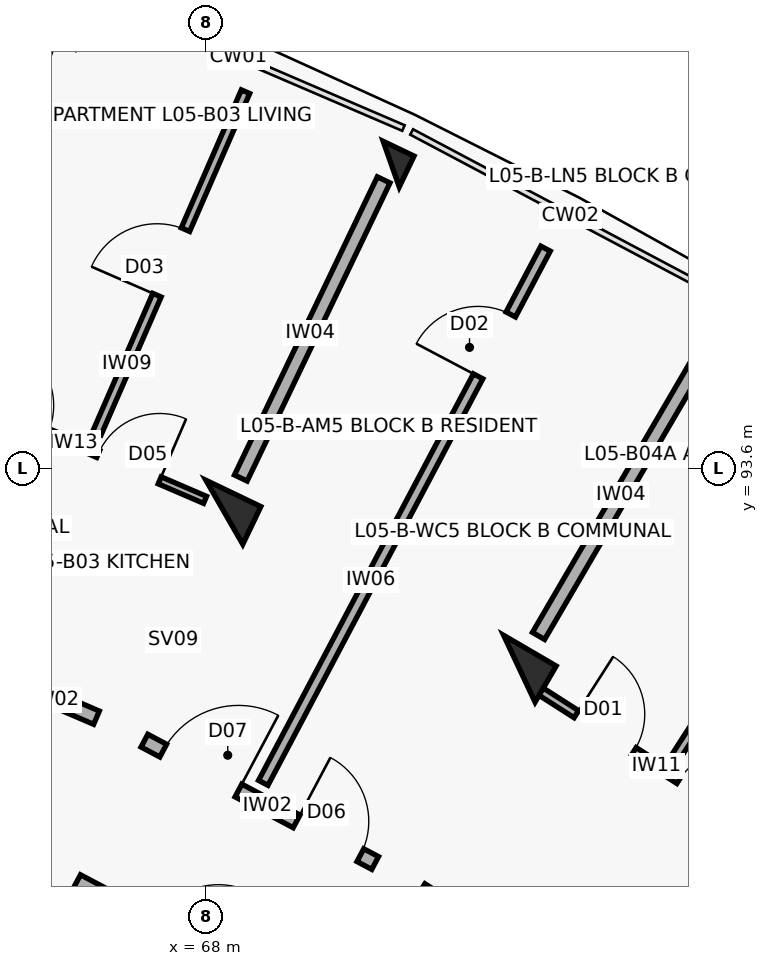
"""IFC4 building model, lengths in metres.
Left out: names, types, materials, properties, quantities, classifications, styles, units other than length and angle.
Written with IfcOpenShell. Run it as: python <this file> out.ifc"""

import sys

from ifc_helpers import new_model, si_unit, direction, frame, frame_2d, origin, origin_2d, place, context, subcontext, project, spatial, rectangle, extrude, element, fill, save


model = new_model("IFC4")
c1 = context("Model", 3, precision=1e-05, world=origin(), true_north=direction((0.0, 1.0)))
c2 = subcontext(c1, "Body", "Model", "MODEL_VIEW")
j1 = project(units=[si_unit("LENGTHUNIT", "METRE"), si_unit("PLANEANGLEUNIT", "RADIAN")], contexts=[c1])
p1 = place(None, origin())
s1 = spatial("IfcSite", under=j1, at=p1, CompositionType="ELEMENT")
p2 = place(p1, origin())
s2 = spatial("IfcBuilding", under=s1, at=p2, CompositionType="ELEMENT")
p3 = place(p2, frame((0.0, 0.0, 17.4)))
s3 = spatial("IfcBuildingStorey", under=s2, at=p3, CompositionType="ELEMENT", Elevation=17.4)
for number, where, z_axis, x_axis in (
    (1, (65.706, 87.716, 0.0), (0.0, 0.0, 1.0), (0.432, 0.902, 0.0)),
    (2, (68.246, 93.019, 0.0), (0.0, 0.0, 1.0), (0.432, 0.902, 0.0)),
):
    element("IfcColumn", number, at=place(p3, frame(where, z_axis=z_axis, x_axis=x_axis)), inside=s3, PredefinedType="COLUMN", context=c2, shape_type="SweptSolid", body=[
        extrude(rectangle(XDim=0.55, YDim=0.8, at=origin_2d()), origin(), (0.0, 0.0, 1.0), 3.1),
    ])
p4 = place(p3, frame((70.441, 97.6, 0.0), z_axis=(0.0, 0.0, 1.0), x_axis=(0.432085748802, 0.901832526405, 0.0)))
e3 = element("IfcColumn", 3, at=p4, inside=s3, PredefinedType="COLUMN", context=c2, shape_type="SweptSolid", body=[
    extrude(rectangle(XDim=0.45, YDim=0.45, at=origin_2d()), origin(), (0.0, 0.0, 1.0), 3.1),
])
p5 = place(p3, frame((72.127, 90.96, 0.0), z_axis=(0.0, 0.0, 1.0), x_axis=(0.504226211181, 0.863571611366, 0.0)))
e4 = element("IfcColumn", 4, at=p5, inside=s3, PredefinedType="COLUMN", context=c2, shape_type="SweptSolid", body=[
    extrude(rectangle(XDim=0.55, YDim=0.8, at=origin_2d()), origin(), (0.0, 0.0, 1.0), 3.1),
])
p6 = place(p3, frame((74.689, 95.347, 0.0), z_axis=(0.0, 0.0, 1.0), x_axis=(0.504226211181, 0.863571611366, 0.0)))
e5 = element("IfcColumn", 5, at=p6, inside=s3, PredefinedType="COLUMN", context=c2, shape_type="SweptSolid", body=[
    extrude(rectangle(XDim=0.5, YDim=0.75, at=origin_2d()), origin(), (0.0, 0.0, 1.0), 3.1),
])
p7 = place(p3, frame((63.407, 91.673, 0.0), z_axis=(0.0, 0.0, 1.0), x_axis=(0.918718172399, -0.394913813008, 0.0)))
e6 = element("IfcWall", 6, at=p7, inside=s3, PredefinedType="SOLIDWALL", context=c2, shape_type="SweptSolid", body=[
    extrude(rectangle(XDim=3.436, YDim=0.19, at=frame_2d((1.718, 0.0))), origin(), (0.0, 0.0, 1.0), 2.08),
])
p8 = place(p7, frame((1.208, 0.0, 0.0)))
e7 = element("IfcOpeningElement", 7, at=p8, cuts=e6, PredefinedType="OPENING", context=c2, shape_type="SweptSolid", body=[
    extrude(rectangle(XDim=1.02, YDim=2.15, at=frame_2d((0.51, 1.075))), frame((0.0, 0.105, 0.0), z_axis=(0.0, -1.0, 0.0), x_axis=(1.0, 0.0, 0.0)), (0.0, 0.0, 1.0), 0.21),
])
p9 = place(p3, frame((64.503, 94.682, 0.0), z_axis=(0.0, 0.0, 1.0), x_axis=(0.918732171064, -0.394881245253, 0.0)))
e8 = element("IfcWall", 8, at=p9, inside=s3, PredefinedType="PARTITIONING", context=c2, shape_type="SweptSolid", body=[
    extrude(rectangle(XDim=3.797, YDim=0.1, at=frame_2d((1.899, 0.0))), origin(), (0.0, 0.0, 1.0), 2.08),
])
p10 = place(p9, frame((0.65, 0.0, 0.0)))
e9 = element("IfcOpeningElement", 9, at=p10, cuts=e8, PredefinedType="OPENING", context=c2, shape_type="SweptSolid", body=[
    extrude(rectangle(XDim=0.9, YDim=2.1, at=frame_2d((0.45, 1.05))), frame((0.0, 0.06, 0.0), z_axis=(0.0, -1.0, 0.0), x_axis=(1.0, 0.0, 0.0)), (0.0, 0.0, 1.0), 0.12),
])
p11 = place(p9, frame((2.267, 0.0, 0.0)))
e10 = element("IfcOpeningElement", 10, at=p11, cuts=e8, PredefinedType="OPENING", context=c2, shape_type="SweptSolid", body=[
    extrude(rectangle(XDim=0.88, YDim=2.1, at=frame_2d((0.44, 1.05))), frame((0.0, 0.06, 0.0), z_axis=(0.0, -1.0, 0.0), x_axis=(1.0, 0.0, 0.0)), (0.0, 0.0, 1.0), 0.12),
])
p12 = place(p3, frame((66.569, 94.06, 0.0), z_axis=(0.0, 0.0, 1.0), x_axis=(0.399048563147, 0.916929792433, 0.0)))
e11 = element("IfcWall", 11, at=p12, inside=s3, PredefinedType="PARTITIONING", context=c2, shape_type="SweptSolid", body=[
    extrude(rectangle(XDim=4.9, YDim=0.12, at=frame_2d((2.45, 0.0))), origin(), (0.0, 0.0, 1.0), 2.08),
])
p13 = place(p12, frame((1.98, 0.0, 0.0)))
e12 = element("IfcOpeningElement", 12, at=p13, cuts=e11, PredefinedType="OPENING", context=c2, shape_type="SweptSolid", body=[
    extrude(rectangle(XDim=0.94, YDim=2.1, at=frame_2d((0.47, 1.05))), frame((0.0, 0.07, 0.0), z_axis=(0.0, -1.0, 0.0), x_axis=(1.0, 0.0, 0.0)), (0.0, 0.0, 1.0), 0.14),
])
p14 = place(p3, frame((64.389, 95.22, 0.0), z_axis=(0.0, 0.0, 1.0), x_axis=(0.357064016205, 0.934079915388, 0.0)))
e13 = element("IfcWall", 13, at=p14, inside=s3, PredefinedType="SOLIDWALL", context=c2, shape_type="SweptSolid", body=[
    extrude(rectangle(XDim=4.35, YDim=0.185, at=frame_2d((2.175, 0.0))), origin(), (0.0, 0.0, 1.0), 2.08),
])
p15 = place(p3, frame((67.194, 90.014, 0.0), z_axis=(0.0, 0.0, 1.0), x_axis=(0.883410853063, -0.468599258099, 0.0)))
e14 = element("IfcWall", 14, at=p15, inside=s3, PredefinedType="SOLIDWALL", context=c2, shape_type="SweptSolid", body=[
    extrude(rectangle(XDim=3.436, YDim=0.19, at=frame_2d((1.718, 0.0))), origin(), (0.0, 0.0, 1.0), 2.08),
])
p16 = place(p15, frame((0.28, 0.0, 0.0)))
e15 = element("IfcOpeningElement", 15, at=p16, cuts=e14, PredefinedType="OPENING", context=c2, shape_type="SweptSolid", body=[
    extrude(rectangle(XDim=1.12, YDim=2.15, at=frame_2d((0.56, 1.075))), frame((0.0, 0.105, 0.0), z_axis=(0.0, -1.0, 0.0), x_axis=(1.0, 0.0, 0.0)), (0.0, 0.0, 1.0), 0.21),
])
p17 = place(p15, frame((2.266, 0.0, 0.0)))
e16 = element("IfcOpeningElement", 16, at=p17, cuts=e14, PredefinedType="OPENING", context=c2, shape_type="SweptSolid", body=[
    extrude(rectangle(XDim=0.95, YDim=2.1, at=frame_2d((0.475, 1.05))), frame((0.0, 0.105, 0.0), z_axis=(0.0, -1.0, 0.0), x_axis=(1.0, 0.0, 0.0)), (0.0, 0.0, 1.0), 0.21),
])
p18 = place(p3, frame((66.309, 88.165, 0.0), z_axis=(0.0, 0.0, 1.0), x_axis=(0.883444301944, -0.468536194293, 0.0)))
e17 = element("IfcWall", 17, at=p18, inside=s3, PredefinedType="SOLIDWALL", context=c2, shape_type="SweptSolid", body=[
    extrude(rectangle(XDim=3.269, YDim=0.19, at=frame_2d((1.634, 0.0))), origin(), (0.0, 0.0, 1.0), 2.08),
])
p19 = place(p18, frame((1.164, 0.0, 0.0)))
e18 = element("IfcOpeningElement", 18, at=p19, cuts=e17, PredefinedType="OPENING", context=c2, shape_type="SweptSolid", body=[
    extrude(rectangle(XDim=0.94, YDim=2.1, at=frame_2d((0.47, 1.05))), frame((0.0, 0.105, 0.0), z_axis=(0.0, -1.0, 0.0), x_axis=(1.0, 0.0, 0.0)), (0.0, 0.0, 1.0), 0.21),
])
p20 = place(p3, frame((68.758, 89.459, 0.0), z_axis=(0.0, 0.0, 1.0), x_axis=(0.467208910392, 0.884146952746, 0.0)))
e19 = element("IfcWall", 19, at=p20, inside=s3, PredefinedType="PARTITIONING", context=c2, shape_type="SweptSolid", body=[
    extrude(rectangle(XDim=7.95, YDim=0.14, at=frame_2d((3.975, 0.0))), origin(), (0.0, 0.0, 1.0), 2.08),
])
p21 = place(p20, frame((6.05, 0.0, 0.0)))
e20 = element("IfcOpeningElement", 20, at=p21, cuts=e19, PredefinedType="OPENING", context=c2, shape_type="SweptSolid", body=[
    extrude(rectangle(XDim=0.92, YDim=2.1, at=frame_2d((0.46, 1.05))), frame((0.0, 0.08, 0.0), z_axis=(0.0, -1.0, 0.0), x_axis=(1.0, 0.0, 0.0)), (0.0, 0.0, 1.0), 0.16),
])
p22 = place(p3, frame((68.462, 93.469, 0.0), z_axis=(0.0, 0.0, 1.0), x_axis=(0.432086898897, 0.901831975371, 0.0)))
e21 = element("IfcWall", 21, at=p22, inside=s3, PredefinedType="SOLIDWALL", context=c2, shape_type="SweptSolid", body=[
    extrude(rectangle(XDim=4.35, YDim=0.185, at=frame_2d((2.175, 0.0))), origin(), (0.0, 0.0, 1.0), 2.08),
])
p23 = place(p3, frame((70.834, 88.051, 0.0), z_axis=(0.0, 0.0, 1.0), x_axis=(0.842257205985, -0.539075874963, 0.0)))
e22 = element("IfcWall", 22, at=p23, inside=s3, PredefinedType="SOLIDWALL", context=c2, shape_type="SweptSolid", body=[
    extrude(rectangle(XDim=3.436, YDim=0.19, at=frame_2d((1.718, 0.0))), origin(), (0.0, 0.0, 1.0), 2.08),
])
p24 = place(p23, frame((1.208, 0.0, 0.0)))
e23 = element("IfcOpeningElement", 23, at=p24, cuts=e22, PredefinedType="OPENING", context=c2, shape_type="SweptSolid", body=[
    extrude(rectangle(XDim=1.02, YDim=2.15, at=frame_2d((0.51, 1.075))), frame((0.0, 0.105, 0.0), z_axis=(0.0, -1.0, 0.0), x_axis=(1.0, 0.0, 0.0)), (0.0, 0.0, 1.0), 0.21),
])
p25 = place(p3, frame((72.33, 90.712, 0.0), z_axis=(0.0, 0.0, 1.0), x_axis=(0.842245628842, -0.539093962771, 0.0)))
e24 = element("IfcWall", 24, at=p25, inside=s3, PredefinedType="PARTITIONING", context=c2, shape_type="SweptSolid", body=[
    extrude(rectangle(XDim=3.785, YDim=0.11, at=frame_2d((1.893, 0.0))), origin(), (0.0, 0.0, 1.0), 2.08),
])
p26 = place(p25, frame((0.65, 0.0, 0.0)))
e25 = element("IfcOpeningElement", 25, at=p26, cuts=e24, PredefinedType="OPENING", context=c2, shape_type="SweptSolid", body=[
    extrude(rectangle(XDim=0.9, YDim=2.1, at=frame_2d((0.45, 1.05))), frame((0.0, 0.065, 0.0), z_axis=(0.0, -1.0, 0.0), x_axis=(1.0, 0.0, 0.0)), (0.0, 0.0, 1.0), 0.13),
])
p27 = place(p25, frame((2.255, 0.0, 0.0)))
e26 = element("IfcOpeningElement", 26, at=p27, cuts=e24, PredefinedType="OPENING", context=c2, shape_type="SweptSolid", body=[
    extrude(rectangle(XDim=0.88, YDim=2.1, at=frame_2d((0.44, 1.05))), frame((0.0, 0.065, 0.0), z_axis=(0.0, -1.0, 0.0), x_axis=(1.0, 0.0, 0.0)), (0.0, 0.0, 1.0), 0.13),
])
p28 = place(p3, frame((74.192, 89.81, 0.0), z_axis=(0.0, 0.0, 1.0), x_axis=(0.541612517702, 0.840628265447, 0.0)))
e27 = element("IfcWall", 27, at=p28, inside=s3, PredefinedType="PARTITIONING", context=c2, shape_type="SweptSolid", body=[
    extrude(rectangle(XDim=5.05, YDim=0.12, at=frame_2d((2.525, 0.0))), origin(), (0.0, 0.0, 1.0), 2.08),
])
p29 = place(p28, frame((2.1, 0.0, 0.0)))
e28 = element("IfcOpeningElement", 28, at=p29, cuts=e27, PredefinedType="OPENING", context=c2, shape_type="SweptSolid", body=[
    extrude(rectangle(XDim=0.85, YDim=2.1, at=frame_2d((0.425, 1.05))), frame((0.0, 0.07, 0.0), z_axis=(0.0, -1.0, 0.0), x_axis=(1.0, 0.0, 0.0)), (0.0, 0.0, 1.0), 0.14),
])
p30 = place(p3, frame((72.379, 91.392, 0.0), z_axis=(0.0, 0.0, 1.0), x_axis=(0.504216452091, 0.863577309475, 0.0)))
e29 = element("IfcWall", 29, at=p30, inside=s3, PredefinedType="SOLIDWALL", context=c2, shape_type="SweptSolid", body=[
    extrude(rectangle(XDim=4.35, YDim=0.185, at=frame_2d((2.175, 0.0))), origin(), (0.0, 0.0, 1.0), 2.08),
])
p31 = place(p11, origin())
e30 = element("IfcDoor", 30, at=p31, inside=s3, OperationType="SINGLE_SWING_RIGHT", PredefinedType="DOOR", context=c2, shape_type="SweptSolid", body=[
    extrude(rectangle(XDim=0.88, YDim=2.1, at=frame_2d((0.44, 1.05))), frame((0.0, 0.025, 0.0), z_axis=(0.0, -1.0, 0.0), x_axis=(1.0, 0.0, 0.0)), (0.0, 0.0, 1.0), 0.05),
])
fill(e10, e30)
p32 = place(p13, origin())
e31 = element("IfcDoor", 31, at=p32, inside=s3, OperationType="SINGLE_SWING_LEFT", PredefinedType="DOOR", context=c2, shape_type="SweptSolid", body=[
    extrude(rectangle(XDim=0.94, YDim=2.1, at=frame_2d((0.47, 1.05))), frame((0.0, 0.025, 0.0), z_axis=(0.0, -1.0, 0.0), x_axis=(1.0, 0.0, 0.0)), (0.0, 0.0, 1.0), 0.05),
])
fill(e12, e31)
p33 = place(p16, origin())
e32 = element("IfcDoor", 32, at=p33, inside=s3, OperationType="SINGLE_SWING_RIGHT", PredefinedType="DOOR", context=c2, shape_type="SweptSolid", body=[
    extrude(rectangle(XDim=1.12, YDim=2.15, at=frame_2d((0.56, 1.075))), frame((0.0, 0.025, 0.0), z_axis=(0.0, -1.0, 0.0), x_axis=(1.0, 0.0, 0.0)), (0.0, 0.0, 1.0), 0.05),
])
fill(e15, e32)
p34 = place(p17, origin())
e33 = element("IfcDoor", 33, at=p34, inside=s3, OperationType="SINGLE_SWING_LEFT", PredefinedType="DOOR", context=c2, shape_type="SweptSolid", body=[
    extrude(rectangle(XDim=0.95, YDim=2.1, at=frame_2d((0.475, 1.05))), frame((0.0, 0.025, 0.0), z_axis=(0.0, -1.0, 0.0), x_axis=(1.0, 0.0, 0.0)), (0.0, 0.0, 1.0), 0.05),
])
fill(e16, e33)
p35 = place(p21, origin())
e34 = element("IfcDoor", 34, at=p35, inside=s3, OperationType="SINGLE_SWING_LEFT", PredefinedType="DOOR", context=c2, shape_type="SweptSolid", body=[
    extrude(rectangle(XDim=0.92, YDim=2.1, at=frame_2d((0.46, 1.05))), frame((0.0, 0.025, 0.0), z_axis=(0.0, -1.0, 0.0), x_axis=(1.0, 0.0, 0.0)), (0.0, 0.0, 1.0), 0.05),
])
fill(e20, e34)
p36 = place(p26, origin())
e35 = element("IfcDoor", 35, at=p36, inside=s3, OperationType="SINGLE_SWING_LEFT", PredefinedType="DOOR", context=c2, shape_type="SweptSolid", body=[
    extrude(rectangle(XDim=0.9, YDim=2.1, at=frame_2d((0.45, 1.05))), frame((0.0, 0.025, 0.0), z_axis=(0.0, -1.0, 0.0), x_axis=(1.0, 0.0, 0.0)), (0.0, 0.0, 1.0), 0.05),
])
fill(e25, e35)
p37 = place(p27, origin())
e36 = element("IfcDoor", 36, at=p37, inside=s3, OperationType="SINGLE_SWING_RIGHT", PredefinedType="DOOR", context=c2, shape_type="SweptSolid", body=[
    extrude(rectangle(XDim=0.88, YDim=2.1, at=frame_2d((0.44, 1.05))), frame((0.0, 0.025, 0.0), z_axis=(0.0, -1.0, 0.0), x_axis=(1.0, 0.0, 0.0)), (0.0, 0.0, 1.0), 0.05),
])
fill(e26, e36)
save(model, sys.argv[1])
